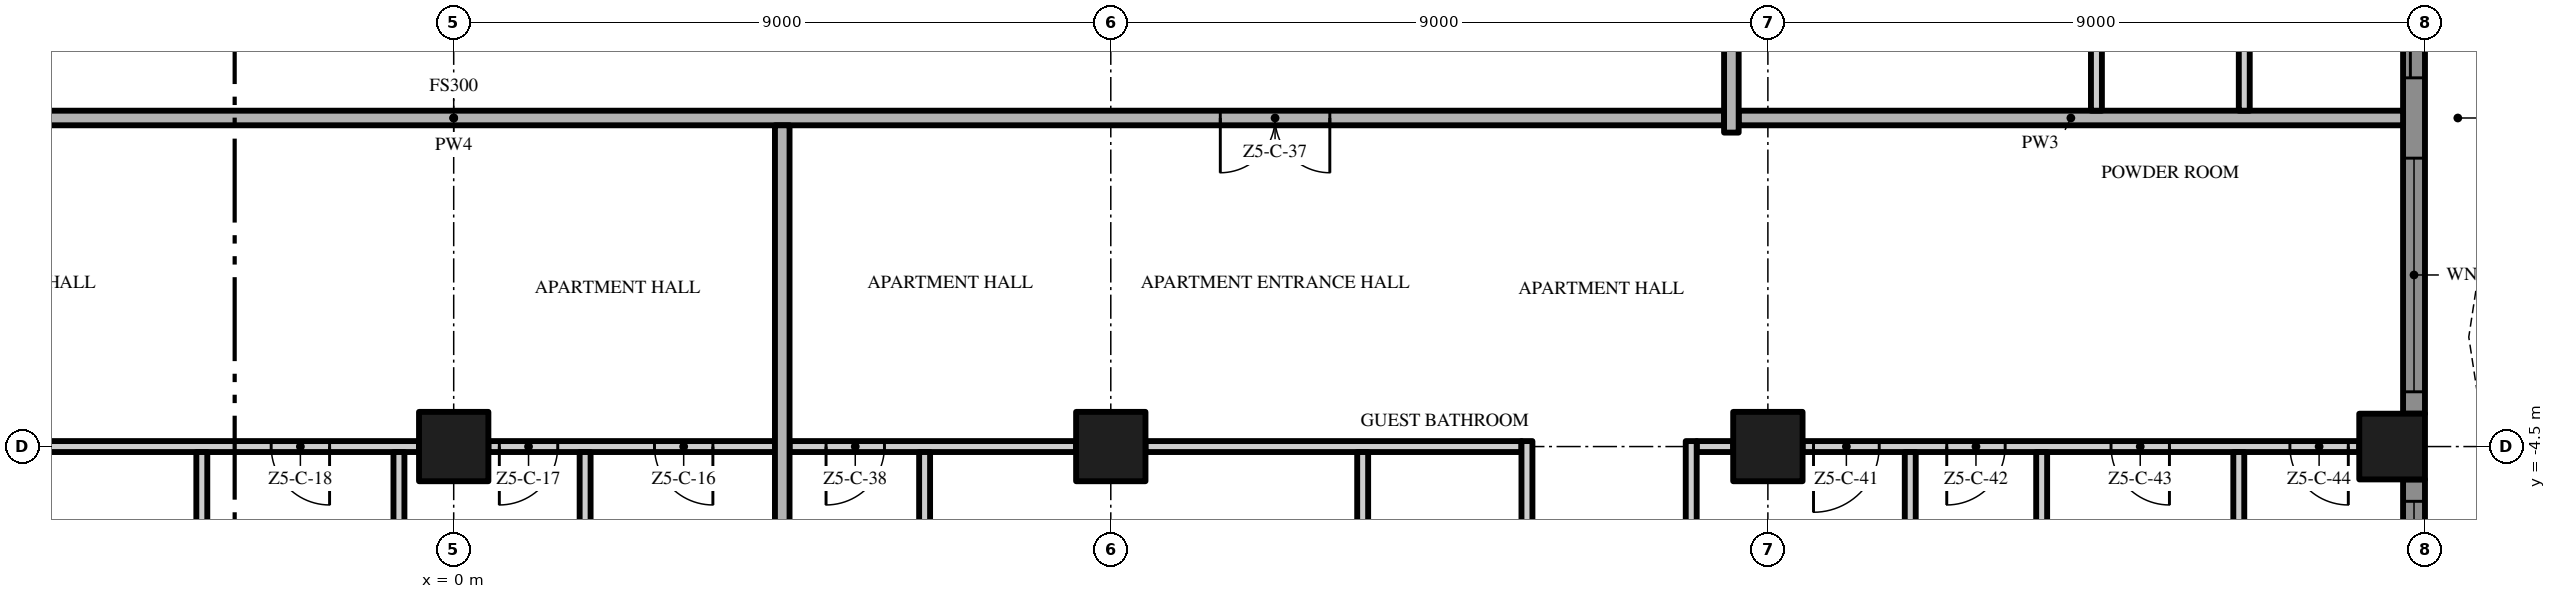
"""IFC4 building model, lengths in metres.
Left out: names, types, materials, properties, quantities, classifications, styles, units other than length and angle.
Written with IfcOpenShell. Run it as: python <this file> out.ifc"""

import sys

from ifc_helpers import new_model, si_unit, direction, frame, frame_2d, origin, origin_2d, place, context, subcontext, project, spatial, polyline, rectangle, outline, extrude, element, fill, save


model = new_model("IFC4")
c1 = context("Model", 3, precision=1e-05, world=origin(), true_north=direction((0.0, 1.0)))
c2 = subcontext(c1, "Body", "Model", "MODEL_VIEW")
j1 = project(units=[si_unit("LENGTHUNIT", "METRE"), si_unit("PLANEANGLEUNIT", "RADIAN")], contexts=[c1])
p1 = place(None, origin())
s1 = spatial("IfcSite", under=j1, at=p1, CompositionType="ELEMENT")
p2 = place(p1, origin())
s2 = spatial("IfcBuilding", under=s1, at=p2, CompositionType="ELEMENT")
p3 = place(p2, frame((0.0, 0.0, 265.4)))
s3 = spatial("IfcBuildingStorey", under=s2, at=p3, CompositionType="ELEMENT", Elevation=265.4)
for number, where, z_axis, x_axis in (
    (1, (0.0, -4.5, 0.0), (0.0, 0.0, 1.0), (1.0, 0.0, 0.0)),
    (2, (18.0, -4.5, 0.0), (0.0, 0.0, 1.0), (1.0, 0.0, 0.0)),
):
    element("IfcColumn", number, at=place(p3, frame(where, z_axis=z_axis, x_axis=x_axis)), inside=s3, PredefinedType="COLUMN", context=c2, shape_type="SweptSolid", body=[
        extrude(rectangle(XDim=0.95, YDim=0.95, at=origin_2d()), origin(), (0.0, 0.0, 1.0), 3.5),
    ])
p4 = place(p3, frame((26.55, -4.5, 0.0), z_axis=(0.0, 0.0, 1.0), x_axis=(1.0, 0.0, 0.0)))
e3 = element("IfcColumn", 3, at=p4, inside=s3, PredefinedType="COLUMN", context=c2, shape_type="SweptSolid", body=[
    extrude(rectangle(XDim=0.9, YDim=0.9, at=origin_2d()), origin(), (0.0, 0.0, 1.0), 3.5),
])
p5 = place(p3, frame((9.0, -4.5, 0.0), z_axis=(0.0, 0.0, 1.0), x_axis=(1.0, 0.0, 0.0)))
e4 = element("IfcColumn", 4, at=p5, inside=s3, PredefinedType="COLUMN", context=c2, shape_type="SweptSolid", body=[
    extrude(rectangle(XDim=0.95, YDim=0.95, at=origin_2d()), origin(), (0.0, 0.0, 1.0), 3.5),
])
p6 = place(p3, frame((26.85, -4.95, 0.0), z_axis=(0.0, 0.0, 1.0), x_axis=(0.0, -1.0, 0.0)))
e5 = element("IfcWall", 5, at=p6, inside=s3, PredefinedType="SOLIDWALL", context=c2, shape_type="SweptSolid", body=[
    extrude(rectangle(XDim=8.1, YDim=0.3, at=frame_2d((4.05, 0.0))), origin(), (0.0, 0.0, 1.0), 3.5),
])
p7 = place(p6, frame((4.6, 0.0, 0.0)))
e6 = element("IfcOpeningElement", 6, at=p7, cuts=e5, PredefinedType="OPENING", context=c2, shape_type="SweptSolid", body=[
    extrude(rectangle(XDim=3.2, YDim=2.4, at=frame_2d((1.6, 1.2))), frame((0.0, 0.16, 0.0), z_axis=(0.0, -1.0, 0.0), x_axis=(1.0, 0.0, 0.0)), (0.0, 0.0, 1.0), 0.32),
])
p8 = place(p6, frame((0.3, 0.0, 0.45)))
e7 = element("IfcOpeningElement", 7, at=p8, cuts=e5, PredefinedType="OPENING", context=c2, shape_type="SweptSolid", body=[
    extrude(rectangle(XDim=3.2, YDim=2.65, at=frame_2d((1.6, 1.325))), frame((0.0, 0.16, 0.0), z_axis=(0.0, -1.0, 0.0), x_axis=(1.0, 0.0, 0.0)), (0.0, 0.0, 1.0), 0.32),
])
p9 = place(p3, frame((26.85, 4.05, 0.0), z_axis=(0.0, 0.0, 1.0), x_axis=(0.0, -1.0, 0.0)))
e8 = element("IfcWall", 8, at=p9, inside=s3, PredefinedType="SOLIDWALL", context=c2, shape_type="SweptSolid", body=[
    extrude(rectangle(XDim=8.1, YDim=0.3, at=frame_2d((4.05, 0.0))), origin(), (0.0, 0.0, 1.0), 3.5),
])
p10 = place(p9, frame((4.6, 0.0, 0.45)))
e9 = element("IfcOpeningElement", 9, at=p10, cuts=e8, PredefinedType="OPENING", context=c2, shape_type="SweptSolid", body=[
    extrude(rectangle(XDim=3.2, YDim=2.65, at=frame_2d((1.6, 1.325))), frame((0.0, 0.16, 0.0), z_axis=(0.0, -1.0, 0.0), x_axis=(1.0, 0.0, 0.0)), (0.0, 0.0, 1.0), 0.32),
])
p11 = place(p9, frame((0.3, 0.0, 0.0)))
e10 = element("IfcOpeningElement", 10, at=p11, cuts=e8, PredefinedType="OPENING", context=c2, shape_type="SweptSolid", body=[
    extrude(rectangle(XDim=3.2, YDim=2.4, at=frame_2d((1.6, 1.2))), frame((0.0, 0.16, 0.0), z_axis=(0.0, -1.0, 0.0), x_axis=(1.0, 0.0, 0.0)), (0.0, 0.0, 1.0), 0.32),
])
p12 = place(p3, origin())
e11 = element("IfcWall", 11, at=p12, inside=s3, PredefinedType="USERDEFINED", context=c2, shape_type="SweptSolid", body=[
    extrude(outline(polyline([(27.6, -18.0), (27.829, -16.5), (28.429, -15.0), (29.171, -13.5), (29.771, -12.0), (30.0, -10.5), (29.771, -9.0), (29.171, -7.5), (28.429, -6.0), (27.829, -4.5), (27.6, -3.0), (27.829, -1.5), (28.429, 0.0), (29.171, 1.5), (29.771, 3.0), (30.0, 4.5), (29.771, 6.0), (29.171, 7.5), (28.429, 9.0), (27.829, 10.5), (27.6, 12.0), (27.829, 13.5), (28.429, 15.0), (29.171, 16.5), (29.771, 18.0), (29.539, 18.093), (28.942, 16.602), (28.201, 15.102), (27.586, 13.566), (27.347, 12.0), (27.586, 10.434), (28.201, 8.898), (28.942, 7.398), (29.528, 5.934), (29.747, 4.5), (29.528, 3.066), (28.942, 1.602), (28.201, 0.102), (27.586, -1.434), (27.347, -3.0), (27.586, -4.566), (28.201, -6.102), (28.942, -7.602), (29.528, -9.066), (29.747, -10.5), (29.528, -11.934), (28.942, -13.398), (28.201, -14.898), (27.586, -16.434), (27.353, -17.962), (27.6, -18.0)])), origin(), (0.0, 0.0, 1.0), 0.9),
])
p13 = place(p3, frame((-0.475, -4.5, 0.0), z_axis=(0.0, 0.0, 1.0), x_axis=(-1.0, 0.0, 0.0)))
e12 = element("IfcWall", 12, at=p13, inside=s3, PredefinedType="PARTITIONING", context=c2, shape_type="SweptSolid", body=[
    extrude(rectangle(XDim=8.05, YDim=0.15, at=frame_2d((4.025, 0.0))), origin(), (0.0, 0.0, 1.0), 3.5),
])
p14 = place(p13, frame((1.225, 0.0, 0.0)))
e13 = element("IfcOpeningElement", 13, at=p14, cuts=e12, PredefinedType="OPENING", context=c2, shape_type="SweptSolid", body=[
    extrude(rectangle(XDim=0.8, YDim=2.0, at=frame_2d((0.4, 1.0))), frame((0.0, 0.085, 0.0), z_axis=(0.0, -1.0, 0.0), x_axis=(1.0, 0.0, 0.0)), (0.0, 0.0, 1.0), 0.17),
])
p15 = place(p3, frame((4.4, -4.5, 0.0), z_axis=(0.0, 0.0, 1.0), x_axis=(-1.0, 0.0, 0.0)))
e14 = element("IfcWall", 14, at=p15, inside=s3, PredefinedType="PARTITIONING", context=c2, shape_type="SweptSolid", body=[
    extrude(rectangle(XDim=3.925, YDim=0.15, at=frame_2d((1.962, 0.0))), origin(), (0.0, 0.0, 1.0), 3.5),
])
p16 = place(p15, frame((0.85, 0.0, 0.0)))
e15 = element("IfcOpeningElement", 15, at=p16, cuts=e14, PredefinedType="OPENING", context=c2, shape_type="SweptSolid", body=[
    extrude(rectangle(XDim=0.8, YDim=2.0, at=frame_2d((0.4, 1.0))), frame((0.0, 0.085, 0.0), z_axis=(0.0, -1.0, 0.0), x_axis=(1.0, 0.0, 0.0)), (0.0, 0.0, 1.0), 0.17),
])
p17 = place(p15, frame((2.975, 0.0, 0.0)))
e16 = element("IfcOpeningElement", 16, at=p17, cuts=e14, PredefinedType="OPENING", context=c2, shape_type="SweptSolid", body=[
    extrude(rectangle(XDim=0.8, YDim=2.0, at=frame_2d((0.4, 1.0))), frame((0.0, 0.085, 0.0), z_axis=(0.0, -1.0, 0.0), x_axis=(1.0, 0.0, 0.0)), (0.0, 0.0, 1.0), 0.17),
])
p18 = place(p3, frame((8.525, -4.5, 0.0), z_axis=(0.0, 0.0, 1.0), x_axis=(-1.0, 0.0, 0.0)))
e17 = element("IfcWall", 17, at=p18, inside=s3, PredefinedType="PARTITIONING", context=c2, shape_type="SweptSolid", body=[
    extrude(rectangle(XDim=3.925, YDim=0.15, at=frame_2d((1.962, 0.0))), origin(), (0.0, 0.0, 1.0), 3.5),
])
p19 = place(p18, frame((2.625, 0.0, 0.0)))
e18 = element("IfcOpeningElement", 18, at=p19, cuts=e17, PredefinedType="OPENING", context=c2, shape_type="SweptSolid", body=[
    extrude(rectangle(XDim=0.8, YDim=2.0, at=frame_2d((0.4, 1.0))), frame((0.0, 0.085, 0.0), z_axis=(0.0, -1.0, 0.0), x_axis=(1.0, 0.0, 0.0)), (0.0, 0.0, 1.0), 0.17),
])
p20 = place(p3, frame((9.475, -4.5, 0.0), z_axis=(0.0, 0.0, 1.0), x_axis=(1.0, 0.0, 0.0)))
e19 = element("IfcWall", 19, at=p20, inside=s3, PredefinedType="PARTITIONING", context=c2, shape_type="SweptSolid", body=[
    extrude(rectangle(XDim=5.15, YDim=0.15, at=frame_2d((2.575, 0.0))), origin(), (0.0, 0.0, 1.0), 3.5),
])
p21 = place(p3, frame((17.025, -4.5, 0.0), z_axis=(0.0, 0.0, 1.0), x_axis=(1.0, 0.0, 0.0)))
e20 = element("IfcWall", 20, at=p21, inside=s3, PredefinedType="PARTITIONING", context=c2, shape_type="SweptSolid", body=[
    extrude(rectangle(XDim=0.5, YDim=0.15, at=frame_2d((0.25, 0.0))), origin(), (0.0, 0.0, 1.0), 3.5),
])
p22 = place(p3, frame((26.1, -4.5, 0.0), z_axis=(0.0, 0.0, 1.0), x_axis=(-1.0, 0.0, 0.0)))
e21 = element("IfcWall", 21, at=p22, inside=s3, PredefinedType="PARTITIONING", context=c2, shape_type="SweptSolid", body=[
    extrude(rectangle(XDim=7.625, YDim=0.15, at=frame_2d((3.812, 0.0))), origin(), (0.0, 0.0, 1.0), 3.5),
])
p23 = place(p22, frame((6.575, 0.0, 0.0)))
e22 = element("IfcOpeningElement", 22, at=p23, cuts=e21, PredefinedType="OPENING", context=c2, shape_type="SweptSolid", body=[
    extrude(rectangle(XDim=0.9, YDim=2.1, at=frame_2d((0.45, 1.05))), frame((0.0, 0.085, 0.0), z_axis=(0.0, -1.0, 0.0), x_axis=(1.0, 0.0, 0.0)), (0.0, 0.0, 1.0), 0.17),
])
p24 = place(p22, frame((4.85, 0.0, 0.0)))
e23 = element("IfcOpeningElement", 23, at=p24, cuts=e21, PredefinedType="OPENING", context=c2, shape_type="SweptSolid", body=[
    extrude(rectangle(XDim=0.8, YDim=2.0, at=frame_2d((0.4, 1.0))), frame((0.0, 0.085, 0.0), z_axis=(0.0, -1.0, 0.0), x_axis=(1.0, 0.0, 0.0)), (0.0, 0.0, 1.0), 0.17),
])
p25 = place(p22, frame((2.6, 0.0, 0.0)))
e24 = element("IfcOpeningElement", 24, at=p25, cuts=e21, PredefinedType="OPENING", context=c2, shape_type="SweptSolid", body=[
    extrude(rectangle(XDim=0.8, YDim=2.0, at=frame_2d((0.4, 1.0))), frame((0.0, 0.085, 0.0), z_axis=(0.0, -1.0, 0.0), x_axis=(1.0, 0.0, 0.0)), (0.0, 0.0, 1.0), 0.17),
])
p26 = place(p22, frame((0.15, 0.0, 0.0)))
e25 = element("IfcOpeningElement", 25, at=p26, cuts=e21, PredefinedType="OPENING", context=c2, shape_type="SweptSolid", body=[
    extrude(rectangle(XDim=0.8, YDim=2.0, at=frame_2d((0.4, 1.0))), frame((0.0, 0.085, 0.0), z_axis=(0.0, -1.0, 0.0), x_axis=(1.0, 0.0, 0.0)), (0.0, 0.0, 1.0), 0.17),
])
p27 = place(p3, frame((17.4, 0.0, 0.0), z_axis=(0.0, 0.0, 1.0), x_axis=(-1.0, 0.0, 0.0)))
e26 = element("IfcWall", 26, at=p27, inside=s3, PredefinedType="PARTITIONING", context=c2, shape_type="SweptSolid", body=[
    extrude(rectangle(XDim=34.8, YDim=0.2, at=frame_2d((17.4, 0.0))), origin(), (0.0, 0.0, 1.0), 3.5),
])
p28 = place(p27, frame((23.4, 0.0, 0.0)))
e27 = element("IfcOpeningElement", 27, at=p28, cuts=e26, PredefinedType="OPENING", context=c2, shape_type="SweptSolid", body=[
    extrude(rectangle(XDim=1.5, YDim=2.4, at=frame_2d((0.75, 1.2))), frame((0.0, 0.11, 0.0), z_axis=(0.0, -1.0, 0.0), x_axis=(1.0, 0.0, 0.0)), (0.0, 0.0, 1.0), 0.22),
])
p29 = place(p27, frame((5.4, 0.0, 0.0)))
e28 = element("IfcOpeningElement", 28, at=p29, cuts=e26, PredefinedType="OPENING", context=c2, shape_type="SweptSolid", body=[
    extrude(rectangle(XDim=1.5, YDim=2.4, at=frame_2d((0.75, 1.2))), frame((0.0, 0.11, 0.0), z_axis=(0.0, -1.0, 0.0), x_axis=(1.0, 0.0, 0.0)), (0.0, 0.0, 1.0), 0.22),
])
p30 = place(p3, frame((17.6, 0.0, 0.0), z_axis=(0.0, 0.0, 1.0), x_axis=(1.0, 0.0, 0.0)))
e29 = element("IfcWall", 29, at=p30, inside=s3, PredefinedType="PARTITIONING", context=c2, shape_type="SweptSolid", body=[
    extrude(rectangle(XDim=9.1, YDim=0.2, at=frame_2d((4.55, 0.0))), origin(), (0.0, 0.0, 1.0), 3.5),
])
for number, where, z_axis, x_axis in (
    (30, (-3.45, -8.925, 0.0), (0.0, 0.0, 1.0), (0.0, 1.0, 0.0)),
    (31, (-0.75, -8.925, 0.0), (0.0, 0.0, 1.0), (0.0, 1.0, 0.0)),
    (32, (1.8, -8.925, 0.0), (0.0, 0.0, 1.0), (0.0, 1.0, 0.0)),
):
    element("IfcWall", number, at=place(p3, frame(where, z_axis=z_axis, x_axis=x_axis)), inside=s3, PredefinedType="PARTITIONING", context=c2, shape_type="SweptSolid", body=[
        extrude(rectangle(XDim=4.35, YDim=0.15, at=frame_2d((2.175, 0.0))), origin(), (0.0, 0.0, 1.0), 3.5),
    ])
p31 = place(p3, frame((4.5, -22.2, 0.0), z_axis=(0.0, 0.0, 1.0), x_axis=(0.0, 1.0, 0.0)))
e33 = element("IfcWall", 33, at=p31, inside=s3, PredefinedType="PARTITIONING", context=c2, shape_type="SweptSolid", body=[
    extrude(rectangle(XDim=22.1, YDim=0.2, at=frame_2d((11.05, 0.0))), origin(), (0.0, 0.0, 1.0), 3.5),
])
for number, where, z_axis, x_axis in (
    (34, (6.45, -8.925, 0.0), (0.0, 0.0, 1.0), (0.0, 1.0, 0.0)),
    (35, (12.45, -8.925, 0.0), (0.0, 0.0, 1.0), (0.0, 1.0, 0.0)),
):
    element("IfcWall", number, at=place(p3, frame(where, z_axis=z_axis, x_axis=x_axis)), inside=s3, PredefinedType="PARTITIONING", context=c2, shape_type="SweptSolid", body=[
        extrude(rectangle(XDim=4.35, YDim=0.15, at=frame_2d((2.175, 0.0))), origin(), (0.0, 0.0, 1.0), 3.5),
    ])
p32 = place(p3, frame((14.7, -9.075, 0.0), z_axis=(0.0, 0.0, 1.0), x_axis=(0.0, 1.0, 0.0)))
e36 = element("IfcWall", 36, at=p32, inside=s3, PredefinedType="PARTITIONING", context=c2, shape_type="SweptSolid", body=[
    extrude(rectangle(XDim=4.65, YDim=0.15, at=frame_2d((2.325, 0.0))), origin(), (0.0, 0.0, 1.0), 3.5),
])
p33 = place(p32, frame((1.875, 0.0, 0.0)))
e37 = element("IfcOpeningElement", 37, at=p33, cuts=e36, PredefinedType="OPENING", context=c2, shape_type="SweptSolid", body=[
    extrude(rectangle(XDim=0.9, YDim=2.1, at=frame_2d((0.45, 1.05))), frame((0.0, 0.085, 0.0), z_axis=(0.0, -1.0, 0.0), x_axis=(1.0, 0.0, 0.0)), (0.0, 0.0, 1.0), 0.17),
])
p34 = place(p3, frame((16.95, -9.075, 0.0), z_axis=(0.0, 0.0, 1.0), x_axis=(0.0, 1.0, 0.0)))
e38 = element("IfcWall", 38, at=p34, inside=s3, PredefinedType="PARTITIONING", context=c2, shape_type="SweptSolid", body=[
    extrude(rectangle(XDim=4.65, YDim=0.15, at=frame_2d((2.325, 0.0))), origin(), (0.0, 0.0, 1.0), 3.5),
])
p35 = place(p3, frame((17.5, -0.2, 0.0), z_axis=(0.0, 0.0, 1.0), x_axis=(0.0, 1.0, 0.0)))
e39 = element("IfcWall", 39, at=p35, inside=s3, PredefinedType="PARTITIONING", context=c2, shape_type="SweptSolid", body=[
    extrude(rectangle(XDim=4.225, YDim=0.2, at=frame_2d((2.112, 0.0))), origin(), (0.0, 0.0, 1.0), 3.5),
])
for number, where, z_axis, x_axis in (
    (40, (19.95, -8.925, 0.0), (0.0, 0.0, 1.0), (0.0, 1.0, 0.0)),
    (41, (21.75, -8.925, 0.0), (0.0, 0.0, 1.0), (0.0, 1.0, 0.0)),
):
    element("IfcWall", number, at=place(p3, frame(where, z_axis=z_axis, x_axis=x_axis)), inside=s3, PredefinedType="PARTITIONING", context=c2, shape_type="SweptSolid", body=[
        extrude(rectangle(XDim=4.35, YDim=0.15, at=frame_2d((2.175, 0.0))), origin(), (0.0, 0.0, 1.0), 3.5),
    ])
p36 = place(p3, frame((22.5, 17.55, 0.0), z_axis=(0.0, 0.0, 1.0), x_axis=(0.0, -1.0, 0.0)))
e42 = element("IfcWall", 42, at=p36, inside=s3, PredefinedType="PARTITIONING", context=c2, shape_type="SweptSolid", body=[
    extrude(rectangle(XDim=17.45, YDim=0.15, at=frame_2d((8.725, 0.0))), origin(), (0.0, 0.0, 1.0), 3.5),
])
p37 = place(p36, frame((13.25, 0.0, 0.0)))
e43 = element("IfcOpeningElement", 43, at=p37, cuts=e42, PredefinedType="OPENING", context=c2, shape_type="SweptSolid", body=[
    extrude(rectangle(XDim=1.8, YDim=2.4, at=frame_2d((0.9, 1.2))), frame((0.0, 0.085, 0.0), z_axis=(0.0, -1.0, 0.0), x_axis=(1.0, 0.0, 0.0)), (0.0, 0.0, 1.0), 0.17),
])
p38 = place(p36, frame((5.8, 0.0, 0.0)))
e44 = element("IfcOpeningElement", 44, at=p38, cuts=e42, PredefinedType="OPENING", context=c2, shape_type="SweptSolid", body=[
    extrude(rectangle(XDim=1.0, YDim=2.4, at=frame_2d((0.5, 1.2))), frame((0.0, 0.085, 0.0), z_axis=(0.0, -1.0, 0.0), x_axis=(1.0, 0.0, 0.0)), (0.0, 0.0, 1.0), 0.17),
])
p39 = place(p3, frame((24.45, -8.925, 0.0), z_axis=(0.0, 0.0, 1.0), x_axis=(0.0, 1.0, 0.0)))
e45 = element("IfcWall", 45, at=p39, inside=s3, PredefinedType="PARTITIONING", context=c2, shape_type="SweptSolid", body=[
    extrude(rectangle(XDim=4.35, YDim=0.15, at=frame_2d((2.175, 0.0))), origin(), (0.0, 0.0, 1.0), 3.5),
])
p40 = place(p3, frame((24.525, 0.1, 0.0), z_axis=(0.0, 0.0, 1.0), x_axis=(0.0, 1.0, 0.0)))
e46 = element("IfcWall", 46, at=p40, inside=s3, PredefinedType="PARTITIONING", context=c2, shape_type="SweptSolid", body=[
    extrude(rectangle(XDim=2.225, YDim=0.15, at=frame_2d((1.113, 0.0))), origin(), (0.0, 0.0, 1.0), 3.5),
])
p41 = place(p8, origin())
e47 = element("IfcWindow", 47, at=p41, inside=s3, PartitioningType="SINGLE_PANEL", PredefinedType="WINDOW", context=c2, shape_type="SweptSolid", body=[
    extrude(rectangle(XDim=3.2, YDim=2.65, at=frame_2d((1.6, 1.325))), frame((0.0, 0.03, 0.0), z_axis=(0.0, -1.0, 0.0), x_axis=(1.0, 0.0, 0.0)), (0.0, 0.0, 1.0), 0.06),
])
fill(e7, e47)
p42 = place(p10, origin())
e48 = element("IfcWindow", 48, at=p42, inside=s3, PartitioningType="SINGLE_PANEL", PredefinedType="WINDOW", context=c2, shape_type="SweptSolid", body=[
    extrude(rectangle(XDim=3.2, YDim=2.65, at=frame_2d((1.6, 1.325))), frame((0.0, 0.03, 0.0), z_axis=(0.0, -1.0, 0.0), x_axis=(1.0, 0.0, 0.0)), (0.0, 0.0, 1.0), 0.06),
])
fill(e9, e48)
p43 = place(p11, origin())
e49 = element("IfcDoor", 49, at=p43, inside=s3, OperationType="SINGLE_SWING_LEFT", PredefinedType="DOOR", context=c2, shape_type="SweptSolid", body=[
    extrude(rectangle(XDim=3.2, YDim=2.4, at=frame_2d((1.6, 1.2))), frame((0.0, 0.025, 0.0), z_axis=(0.0, -1.0, 0.0), x_axis=(1.0, 0.0, 0.0)), (0.0, 0.0, 1.0), 0.05),
])
fill(e10, e49)
p44 = place(p16, origin())
e50 = element("IfcDoor", 50, at=p44, inside=s3, OperationType="SINGLE_SWING_LEFT", PredefinedType="DOOR", context=c2, shape_type="SweptSolid", body=[
    extrude(rectangle(XDim=0.8, YDim=2.0, at=frame_2d((0.4, 1.0))), frame((0.0, 0.025, 0.0), z_axis=(0.0, -1.0, 0.0), x_axis=(1.0, 0.0, 0.0)), (0.0, 0.0, 1.0), 0.05),
])
fill(e15, e50)
p45 = place(p17, origin())
e51 = element("IfcDoor", 51, at=p45, inside=s3, OperationType="SINGLE_SWING_RIGHT", PredefinedType="DOOR", context=c2, shape_type="SweptSolid", body=[
    extrude(rectangle(XDim=0.8, YDim=2.0, at=frame_2d((0.4, 1.0))), frame((0.0, 0.025, 0.0), z_axis=(0.0, -1.0, 0.0), x_axis=(1.0, 0.0, 0.0)), (0.0, 0.0, 1.0), 0.05),
])
fill(e16, e51)
p46 = place(p14, origin())
e52 = element("IfcDoor", 52, at=p46, inside=s3, OperationType="SINGLE_SWING_LEFT", PredefinedType="DOOR", context=c2, shape_type="SweptSolid", body=[
    extrude(rectangle(XDim=0.8, YDim=2.0, at=frame_2d((0.4, 1.0))), frame((0.0, 0.025, 0.0), z_axis=(0.0, -1.0, 0.0), x_axis=(1.0, 0.0, 0.0)), (0.0, 0.0, 1.0), 0.05),
])
fill(e13, e52)
p47 = place(p29, origin())
e53 = element("IfcDoor", 53, at=p47, inside=s3, OperationType="DOUBLE_DOOR_SINGLE_SWING", PredefinedType="DOOR", context=c2, shape_type="SweptSolid", body=[
    extrude(rectangle(XDim=1.5, YDim=2.4, at=frame_2d((0.75, 1.2))), frame((0.0, 0.025, 0.0), z_axis=(0.0, -1.0, 0.0), x_axis=(1.0, 0.0, 0.0)), (0.0, 0.0, 1.0), 0.05),
])
fill(e28, e53)
p48 = place(p19, origin())
e54 = element("IfcDoor", 54, at=p48, inside=s3, OperationType="SINGLE_SWING_RIGHT", PredefinedType="DOOR", context=c2, shape_type="SweptSolid", body=[
    extrude(rectangle(XDim=0.8, YDim=2.0, at=frame_2d((0.4, 1.0))), frame((0.0, 0.025, 0.0), z_axis=(0.0, -1.0, 0.0), x_axis=(1.0, 0.0, 0.0)), (0.0, 0.0, 1.0), 0.05),
])
fill(e18, e54)
p49 = place(p23, origin())
e55 = element("IfcDoor", 55, at=p49, inside=s3, OperationType="SINGLE_SWING_RIGHT", PredefinedType="DOOR", context=c2, shape_type="SweptSolid", body=[
    extrude(rectangle(XDim=0.9, YDim=2.1, at=frame_2d((0.45, 1.05))), frame((0.0, 0.025, 0.0), z_axis=(0.0, -1.0, 0.0), x_axis=(1.0, 0.0, 0.0)), (0.0, 0.0, 1.0), 0.05),
])
fill(e22, e55)
p50 = place(p24, origin())
e56 = element("IfcDoor", 56, at=p50, inside=s3, OperationType="SINGLE_SWING_RIGHT", PredefinedType="DOOR", context=c2, shape_type="SweptSolid", body=[
    extrude(rectangle(XDim=0.8, YDim=2.0, at=frame_2d((0.4, 1.0))), frame((0.0, 0.025, 0.0), z_axis=(0.0, -1.0, 0.0), x_axis=(1.0, 0.0, 0.0)), (0.0, 0.0, 1.0), 0.05),
])
fill(e23, e56)
p51 = place(p25, origin())
e57 = element("IfcDoor", 57, at=p51, inside=s3, OperationType="SINGLE_SWING_LEFT", PredefinedType="DOOR", context=c2, shape_type="SweptSolid", body=[
    extrude(rectangle(XDim=0.8, YDim=2.0, at=frame_2d((0.4, 1.0))), frame((0.0, 0.025, 0.0), z_axis=(0.0, -1.0, 0.0), x_axis=(1.0, 0.0, 0.0)), (0.0, 0.0, 1.0), 0.05),
])
fill(e24, e57)
p52 = place(p26, origin())
e58 = element("IfcDoor", 58, at=p52, inside=s3, OperationType="SINGLE_SWING_LEFT", PredefinedType="DOOR", context=c2, shape_type="SweptSolid", body=[
    extrude(rectangle(XDim=0.8, YDim=2.0, at=frame_2d((0.4, 1.0))), frame((0.0, 0.025, 0.0), z_axis=(0.0, -1.0, 0.0), x_axis=(1.0, 0.0, 0.0)), (0.0, 0.0, 1.0), 0.05),
])
fill(e25, e58)
save(model, sys.argv[1])
